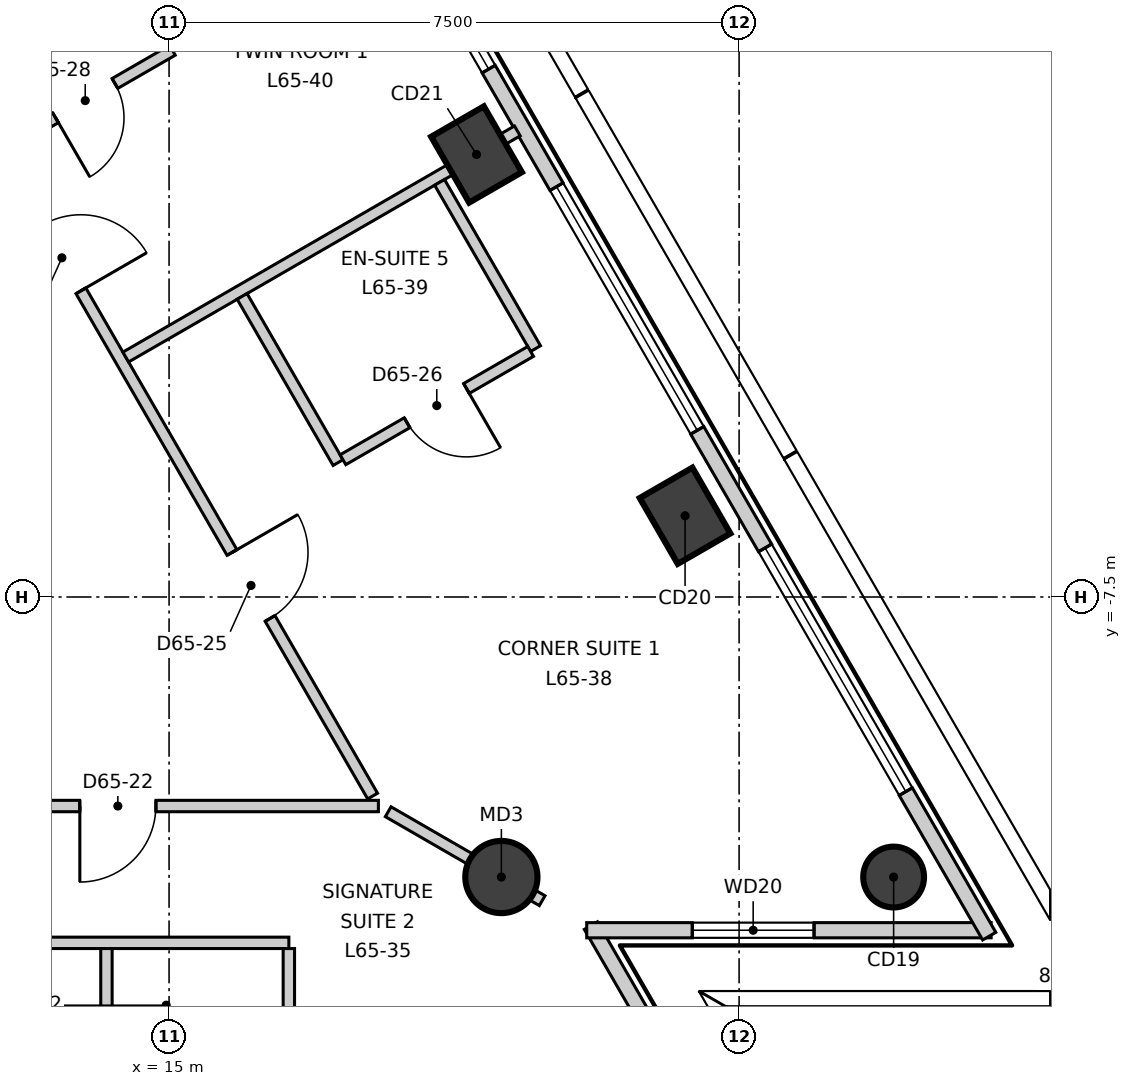
"""IFC4 building model, lengths in metres.
Left out: names, types, materials, properties, quantities, classifications, styles, units other than length and angle.
Written with IfcOpenShell. Run it as: python <this file> out.ifc"""

import sys

from ifc_helpers import new_model, si_unit, direction, frame, frame_2d, origin, origin_2d, place, context, subcontext, project, spatial, rectangle, circle, extrude, element, fill, save


model = new_model("IFC4")
c1 = context("Model", 3, precision=1e-05, world=origin(), true_north=direction((0.0, 1.0)))
c2 = subcontext(c1, "Body", "Model", "MODEL_VIEW")
j1 = project(units=[si_unit("LENGTHUNIT", "METRE"), si_unit("PLANEANGLEUNIT", "RADIAN")], contexts=[c1])
p1 = place(None, origin())
s1 = spatial("IfcSite", under=j1, at=p1, CompositionType="ELEMENT")
p2 = place(p1, origin())
s2 = spatial("IfcBuilding", under=s1, at=p2, CompositionType="ELEMENT")
p3 = place(p2, frame((0.0, 0.0, 279.1)))
s3 = spatial("IfcBuildingStorey", under=s2, at=p3, CompositionType="ELEMENT", Elevation=279.1)
p4 = place(p3, frame((24.533, -11.184, -0.3), z_axis=(0.0, 0.0, 1.0), x_axis=(-0.5, 0.866025403784, 0.0)))
e1 = element("IfcColumn", 1, at=p4, inside=s3, PredefinedType="COLUMN", context=c2, shape_type="SweptSolid", body=[
    extrude(circle(Radius=0.4, at=origin_2d()), origin(), (0.0, 0.0, 1.0), 3.6),
])
for number, where, z_axis, x_axis in (
    (2, (21.789, -6.431, -0.3), (0.0, 0.0, 1.0), (-0.5, 0.866, 0.0)),
    (3, (19.045, -1.678, -0.3), (0.0, 0.0, 1.0), (-0.5, 0.866, 0.0)),
):
    element("IfcColumn", number, at=place(p3, frame(where, z_axis=z_axis, x_axis=x_axis)), inside=s3, PredefinedType="COLUMN", context=c2, shape_type="SweptSolid", body=[
        extrude(rectangle(XDim=1.0, YDim=0.8, at=origin_2d()), origin(), (0.0, 0.0, 1.0), 3.6),
    ])
p5 = place(p3, frame((19.372, -11.184, -0.3), z_axis=(0.0, 0.0, 1.0), x_axis=(1.0, 0.0, 0.0)))
e4 = element("IfcColumn", 4, at=p5, inside=s3, PredefinedType="COLUMN", context=c2, shape_type="SweptSolid", body=[
    extrude(circle(Radius=0.475, at=origin_2d()), origin(), (0.0, 0.0, 1.0), 3.6),
])
p6 = place(p3, frame((23.21, -16.432, 0.0), z_axis=(0.0, 0.0, 1.0), x_axis=(-0.499854840714, 0.866109195318, 0.0)))
e5 = element("IfcWall", 5, at=p6, inside=s3, PredefinedType="ELEMENTEDWALL", context=c2, shape_type="SweptSolid", body=[
    extrude(rectangle(XDim=5.321, YDim=0.2, at=frame_2d((2.661, 0.0))), origin(), (0.0, 0.0, 1.0), 3.3),
])
p7 = place(p6, frame((1.99, 0.0, 0.9)))
e6 = element("IfcOpeningElement", 6, at=p7, cuts=e5, PredefinedType="OPENING", context=c2, shape_type="SweptSolid", body=[
    extrude(rectangle(XDim=1.6, YDim=2.2, at=frame_2d((0.8, 1.1))), frame((0.0, 0.11, 0.0), z_axis=(0.0, -1.0, 0.0), x_axis=(1.0, 0.0, 0.0)), (0.0, 0.0, 1.0), 0.22),
])
p8 = place(p3, frame((20.495, -11.884, 0.0), z_axis=(0.0, 0.0, 1.0), x_axis=(1.0, 0.0, 0.0)))
e7 = element("IfcWall", 7, at=p8, inside=s3, PredefinedType="ELEMENTEDWALL", context=c2, shape_type="SweptSolid", body=[
    extrude(rectangle(XDim=5.321, YDim=0.2, at=frame_2d((2.66, 0.0))), origin(), (0.0, 0.0, 1.0), 3.3),
])
p9 = place(p8, frame((1.39, 0.0, 0.9)))
e8 = element("IfcOpeningElement", 8, at=p9, cuts=e7, PredefinedType="OPENING", context=c2, shape_type="SweptSolid", body=[
    extrude(rectangle(XDim=1.6, YDim=2.2, at=frame_2d((0.8, 1.1))), frame((0.0, 0.11, 0.0), z_axis=(0.0, -1.0, 0.0), x_axis=(1.0, 0.0, 0.0)), (0.0, 0.0, 1.0), 0.22),
])
p10 = place(p3, frame((25.791, -11.962, 0.0), z_axis=(0.0, 0.0, 1.0), x_axis=(-0.500006870765, 0.86602143691, 0.0)))
e9 = element("IfcWall", 9, at=p10, inside=s3, PredefinedType="ELEMENTEDWALL", context=c2, shape_type="SweptSolid", body=[
    extrude(rectangle(XDim=46.49, YDim=0.2, at=frame_2d((23.245, 0.0))), origin(), (0.0, 0.0, 1.0), 3.3),
])
p11 = place(p10, frame((2.197, 0.0, 0.9)))
e10 = element("IfcOpeningElement", 10, at=p11, cuts=e9, PredefinedType="OPENING", context=c2, shape_type="SweptSolid", body=[
    extrude(rectangle(XDim=3.7, YDim=2.2, at=frame_2d((1.85, 1.1))), frame((0.0, 0.11, 0.0), z_axis=(0.0, -1.0, 0.0), x_axis=(1.0, 0.0, 0.0)), (0.0, 0.0, 1.0), 0.22),
])
p12 = place(p10, frame((7.685, 0.0, 0.9)))
e11 = element("IfcOpeningElement", 11, at=p12, cuts=e9, PredefinedType="OPENING", context=c2, shape_type="SweptSolid", body=[
    extrude(rectangle(XDim=3.7, YDim=2.2, at=frame_2d((1.85, 1.1))), frame((0.0, 0.11, 0.0), z_axis=(0.0, -1.0, 0.0), x_axis=(1.0, 0.0, 0.0)), (0.0, 0.0, 1.0), 0.22),
])
p13 = place(p10, frame((13.173, 0.0, 0.9)))
e12 = element("IfcOpeningElement", 12, at=p13, cuts=e9, PredefinedType="OPENING", context=c2, shape_type="SweptSolid", body=[
    extrude(rectangle(XDim=3.7, YDim=2.2, at=frame_2d((1.85, 1.1))), frame((0.0, 0.11, 0.0), z_axis=(0.0, -1.0, 0.0), x_axis=(1.0, 0.0, 0.0)), (0.0, 0.0, 1.0), 0.22),
])
p14 = place(p10, frame((18.661, 0.0, 0.9)))
e13 = element("IfcOpeningElement", 13, at=p14, cuts=e9, PredefinedType="OPENING", context=c2, shape_type="SweptSolid", body=[
    extrude(rectangle(XDim=3.7, YDim=2.2, at=frame_2d((1.85, 1.1))), frame((0.0, 0.11, 0.0), z_axis=(0.0, -1.0, 0.0), x_axis=(1.0, 0.0, 0.0)), (0.0, 0.0, 1.0), 0.22),
])
p15 = place(p10, frame((24.149, 0.0, 0.9)))
e14 = element("IfcOpeningElement", 14, at=p15, cuts=e9, PredefinedType="OPENING", context=c2, shape_type="SweptSolid", body=[
    extrude(rectangle(XDim=3.7, YDim=2.2, at=frame_2d((1.85, 1.1))), frame((0.0, 0.11, 0.0), z_axis=(0.0, -1.0, 0.0), x_axis=(1.0, 0.0, 0.0)), (0.0, 0.0, 1.0), 0.22),
])
p16 = place(p10, frame((29.637, 0.0, 0.9)))
e15 = element("IfcOpeningElement", 15, at=p16, cuts=e9, PredefinedType="OPENING", context=c2, shape_type="SweptSolid", body=[
    extrude(rectangle(XDim=3.7, YDim=2.2, at=frame_2d((1.85, 1.1))), frame((0.0, 0.11, 0.0), z_axis=(0.0, -1.0, 0.0), x_axis=(1.0, 0.0, 0.0)), (0.0, 0.0, 1.0), 0.22),
])
p17 = place(p10, frame((35.125, 0.0, 0.9)))
e16 = element("IfcOpeningElement", 16, at=p17, cuts=e9, PredefinedType="OPENING", context=c2, shape_type="SweptSolid", body=[
    extrude(rectangle(XDim=3.7, YDim=2.2, at=frame_2d((1.85, 1.1))), frame((0.0, 0.11, 0.0), z_axis=(0.0, -1.0, 0.0), x_axis=(1.0, 0.0, 0.0)), (0.0, 0.0, 1.0), 0.22),
])
p18 = place(p10, frame((40.613, 0.0, 0.9)))
e17 = element("IfcOpeningElement", 17, at=p18, cuts=e9, PredefinedType="OPENING", context=c2, shape_type="SweptSolid", body=[
    extrude(rectangle(XDim=3.7, YDim=2.2, at=frame_2d((1.85, 1.1))), frame((0.0, 0.11, 0.0), z_axis=(0.0, -1.0, 0.0), x_axis=(1.0, 0.0, 0.0)), (0.0, 0.0, 1.0), 0.22),
])
p19 = place(p3, frame((-17.604, -10.25, 0.0), z_axis=(0.0, 0.0, 1.0), x_axis=(1.0, 0.0, 0.0)))
e18 = element("IfcWall", 18, at=p19, inside=s3, PredefinedType="PARTITIONING", context=c2, shape_type="SweptSolid", body=[
    extrude(rectangle(XDim=35.358, YDim=0.15, at=frame_2d((17.679, 0.0))), origin(), (0.0, 0.0, 1.0), 3.3),
])
p20 = place(p19, frame((2.7, 0.0, 0.0)))
e19 = element("IfcOpeningElement", 19, at=p20, cuts=e18, PredefinedType="OPENING", context=c2, shape_type="SweptSolid", body=[
    extrude(rectangle(XDim=1.0, YDim=2.1, at=frame_2d((0.5, 1.05))), frame((0.0, 0.085, 0.0), z_axis=(0.0, -1.0, 0.0), x_axis=(1.0, 0.0, 0.0)), (0.0, 0.0, 1.0), 0.17),
])
p21 = place(p19, frame((14.878, 0.0, 0.0)))
e20 = element("IfcOpeningElement", 20, at=p21, cuts=e18, PredefinedType="OPENING", context=c2, shape_type="SweptSolid", body=[
    extrude(rectangle(XDim=1.0, YDim=2.1, at=frame_2d((0.5, 1.05))), frame((0.0, 0.085, 0.0), z_axis=(0.0, -1.0, 0.0), x_axis=(1.0, 0.0, 0.0)), (0.0, 0.0, 1.0), 0.17),
])
p22 = place(p19, frame((9.578, 0.0, 0.0)))
e21 = element("IfcOpeningElement", 21, at=p22, cuts=e18, PredefinedType="OPENING", context=c2, shape_type="SweptSolid", body=[
    extrude(rectangle(XDim=0.9, YDim=2.1, at=frame_2d((0.45, 1.05))), frame((0.0, 0.085, 0.0), z_axis=(0.0, -1.0, 0.0), x_axis=(1.0, 0.0, 0.0)), (0.0, 0.0, 1.0), 0.17),
])
p23 = place(p19, frame((11.678, 0.0, 0.0)))
e22 = element("IfcOpeningElement", 22, at=p23, cuts=e18, PredefinedType="OPENING", context=c2, shape_type="SweptSolid", body=[
    extrude(rectangle(XDim=0.9, YDim=2.1, at=frame_2d((0.45, 1.05))), frame((0.0, 0.085, 0.0), z_axis=(0.0, -1.0, 0.0), x_axis=(1.0, 0.0, 0.0)), (0.0, 0.0, 1.0), 0.17),
])
p24 = place(p19, frame((25.854, 0.0, 0.0)))
e23 = element("IfcOpeningElement", 23, at=p24, cuts=e18, PredefinedType="OPENING", context=c2, shape_type="SweptSolid", body=[
    extrude(rectangle(XDim=1.0, YDim=2.1, at=frame_2d((0.5, 1.05))), frame((0.0, 0.085, 0.0), z_axis=(0.0, -1.0, 0.0), x_axis=(1.0, 0.0, 0.0)), (0.0, 0.0, 1.0), 0.17),
])
p25 = place(p19, frame((20.554, 0.0, 0.0)))
e24 = element("IfcOpeningElement", 24, at=p25, cuts=e18, PredefinedType="OPENING", context=c2, shape_type="SweptSolid", body=[
    extrude(rectangle(XDim=0.9, YDim=2.1, at=frame_2d((0.45, 1.05))), frame((0.0, 0.085, 0.0), z_axis=(0.0, -1.0, 0.0), x_axis=(1.0, 0.0, 0.0)), (0.0, 0.0, 1.0), 0.17),
])
p26 = place(p19, frame((22.654, 0.0, 0.0)))
e25 = element("IfcOpeningElement", 25, at=p26, cuts=e18, PredefinedType="OPENING", context=c2, shape_type="SweptSolid", body=[
    extrude(rectangle(XDim=0.9, YDim=2.1, at=frame_2d((0.45, 1.05))), frame((0.0, 0.085, 0.0), z_axis=(0.0, -1.0, 0.0), x_axis=(1.0, 0.0, 0.0)), (0.0, 0.0, 1.0), 0.17),
])
p27 = place(p19, frame((31.43, 0.0, 0.0)))
e26 = element("IfcOpeningElement", 26, at=p27, cuts=e18, PredefinedType="OPENING", context=c2, shape_type="SweptSolid", body=[
    extrude(rectangle(XDim=1.0, YDim=2.1, at=frame_2d((0.5, 1.05))), frame((0.0, 0.085, 0.0), z_axis=(0.0, -1.0, 0.0), x_axis=(1.0, 0.0, 0.0)), (0.0, 0.0, 1.0), 0.17),
])
p28 = place(p3, frame((17.883, -10.325, 0.0), z_axis=(0.0, 0.0, 1.0), x_axis=(0.865928350888, -0.500168062883, 0.0)))
e27 = element("IfcWall", 27, at=p28, inside=s3, PredefinedType="PARTITIONING", context=c2, shape_type="SweptSolid", body=[
    extrude(rectangle(XDim=2.34, YDim=0.15, at=frame_2d((1.17, 0.0))), origin(), (0.0, 0.0, 1.0), 2.8),
])
p29 = place(p3, frame((0.075, 20.37, 0.0), z_axis=(0.0, 0.0, 1.0), x_axis=(0.500003985697, -0.866023102629, 0.0)))
e28 = element("IfcWall", 28, at=p29, inside=s3, PredefinedType="PARTITIONING", context=c2, shape_type="SweptSolid", body=[
    extrude(rectangle(XDim=35.206, YDim=0.15, at=frame_2d((17.603, 0.0))), origin(), (0.0, 0.0, 1.0), 3.3),
])
p30 = place(p29, frame((31.506, 0.0, 0.0)))
e29 = element("IfcOpeningElement", 29, at=p30, cuts=e28, PredefinedType="OPENING", context=c2, shape_type="SweptSolid", body=[
    extrude(rectangle(XDim=1.0, YDim=2.1, at=frame_2d((0.5, 1.05))), frame((0.0, 0.085, 0.0), z_axis=(0.0, -1.0, 0.0), x_axis=(1.0, 0.0, 0.0)), (0.0, 0.0, 1.0), 0.17),
])
p31 = place(p29, frame((26.529, 0.0, 0.0)))
e30 = element("IfcOpeningElement", 30, at=p31, cuts=e28, PredefinedType="OPENING", context=c2, shape_type="SweptSolid", body=[
    extrude(rectangle(XDim=1.0, YDim=2.1, at=frame_2d((0.5, 1.05))), frame((0.0, 0.085, 0.0), z_axis=(0.0, -1.0, 0.0), x_axis=(1.0, 0.0, 0.0)), (0.0, 0.0, 1.0), 0.17),
])
p32 = place(p29, frame((19.442, 0.0, 0.0)))
e31 = element("IfcOpeningElement", 31, at=p32, cuts=e28, PredefinedType="OPENING", context=c2, shape_type="SweptSolid", body=[
    extrude(rectangle(XDim=1.0, YDim=2.1, at=frame_2d((0.5, 1.05))), frame((0.0, 0.085, 0.0), z_axis=(0.0, -1.0, 0.0), x_axis=(1.0, 0.0, 0.0)), (0.0, 0.0, 1.0), 0.17),
])
p33 = place(p29, frame((8.254, 0.0, 0.0)))
e32 = element("IfcOpeningElement", 32, at=p33, cuts=e28, PredefinedType="OPENING", context=c2, shape_type="SweptSolid", body=[
    extrude(rectangle(XDim=1.0, YDim=2.1, at=frame_2d((0.5, 1.05))), frame((0.0, 0.085, 0.0), z_axis=(0.0, -1.0, 0.0), x_axis=(1.0, 0.0, 0.0)), (0.0, 0.0, 1.0), 0.17),
])
p34 = place(p29, frame((13.754, 0.0, 0.0)))
e33 = element("IfcOpeningElement", 33, at=p34, cuts=e28, PredefinedType="OPENING", context=c2, shape_type="SweptSolid", body=[
    extrude(rectangle(XDim=0.9, YDim=2.1, at=frame_2d((0.45, 1.05))), frame((0.0, 0.085, 0.0), z_axis=(0.0, -1.0, 0.0), x_axis=(1.0, 0.0, 0.0)), (0.0, 0.0, 1.0), 0.17),
])
p35 = place(p29, frame((11.554, 0.0, 0.0)))
e34 = element("IfcOpeningElement", 34, at=p35, cuts=e28, PredefinedType="OPENING", context=c2, shape_type="SweptSolid", body=[
    extrude(rectangle(XDim=0.9, YDim=2.1, at=frame_2d((0.45, 1.05))), frame((0.0, 0.085, 0.0), z_axis=(0.0, -1.0, 0.0), x_axis=(1.0, 0.0, 0.0)), (0.0, 0.0, 1.0), 0.17),
])
p36 = place(p29, frame((2.777, 0.0, 0.0)))
e35 = element("IfcOpeningElement", 35, at=p36, cuts=e28, PredefinedType="OPENING", context=c2, shape_type="SweptSolid", body=[
    extrude(rectangle(XDim=1.0, YDim=2.1, at=frame_2d((0.5, 1.05))), frame((0.0, 0.085, 0.0), z_axis=(0.0, -1.0, 0.0), x_axis=(1.0, 0.0, 0.0)), (0.0, 0.0, 1.0), 0.17),
])
p37 = place(p3, frame((14.43, -4.343, 0.0), z_axis=(0.0, 0.0, 1.0), x_axis=(0.865986712877, 0.50006700863, 0.0)))
e36 = element("IfcWall", 36, at=p37, inside=s3, PredefinedType="PARTITIONING", context=c2, shape_type="SweptSolid", body=[
    extrude(rectangle(XDim=5.949, YDim=0.15, at=frame_2d((2.975, 0.0))), origin(), (0.0, 0.0, 1.0), 3.3),
])
p38 = place(p3, frame((11.051, -12.05, 0.0), z_axis=(0.0, 0.0, 1.0), x_axis=(1.0, 0.0, 0.0)))
e37 = element("IfcWall", 37, at=p38, inside=s3, PredefinedType="PARTITIONING", context=c2, shape_type="SweptSolid", body=[
    extrude(rectangle(XDim=5.525, YDim=0.15, at=frame_2d((2.762, 0.0))), origin(), (0.0, 0.0, 1.0), 3.3),
])
p39 = place(p38, frame((1.075, 0.0, 0.0)))
e38 = element("IfcOpeningElement", 38, at=p39, cuts=e37, PredefinedType="OPENING", context=c2, shape_type="SweptSolid", body=[
    extrude(rectangle(XDim=0.9, YDim=2.1, at=frame_2d((0.45, 1.05))), frame((0.0, 0.085, 0.0), z_axis=(0.0, -1.0, 0.0), x_axis=(1.0, 0.0, 0.0)), (0.0, 0.0, 1.0), 0.17),
])
p40 = place(p3, frame((15.961, -3.545, 0.0), z_axis=(0.0, 0.0, 1.0), x_axis=(0.499789415832, -0.866146950478, 0.0)))
e39 = element("IfcWall", 39, at=p40, inside=s3, PredefinedType="PARTITIONING", context=c2, shape_type="SweptSolid", body=[
    extrude(rectangle(XDim=2.525, YDim=0.15, at=frame_2d((1.262, 0.0))), origin(), (0.0, 0.0, 1.0), 3.3),
])
p41 = place(p3, frame((18.559, -2.045, 0.0), z_axis=(0.0, 0.0, 1.0), x_axis=(0.500079482444, -0.865979509711, 0.0)))
e40 = element("IfcWall", 40, at=p41, inside=s3, PredefinedType="PARTITIONING", context=c2, shape_type="SweptSolid", body=[
    extrude(rectangle(XDim=2.525, YDim=0.15, at=frame_2d((1.263, 0.0))), origin(), (0.0, 0.0, 1.0), 3.3),
])
p42 = place(p3, frame((14.176, -14.975, 0.0), z_axis=(0.0, 0.0, 1.0), x_axis=(0.0, 1.0, 0.0)))
e41 = element("IfcWall", 41, at=p42, inside=s3, PredefinedType="PARTITIONING", context=c2, shape_type="SweptSolid", body=[
    extrude(rectangle(XDim=2.85, YDim=0.15, at=frame_2d((1.425, 0.0))), origin(), (0.0, 0.0, 1.0), 3.3),
])
p43 = place(p3, frame((12.836, -1.582, 0.0), z_axis=(0.0, 0.0, 1.0), x_axis=(0.865965520905, 0.500103705848, 0.0)))
e42 = element("IfcWall", 42, at=p43, inside=s3, PredefinedType="PARTITIONING", context=c2, shape_type="SweptSolid", body=[
    extrude(rectangle(XDim=2.55, YDim=0.15, at=frame_2d((1.275, 0.0))), origin(), (0.0, 0.0, 1.0), 3.3),
])
p44 = place(p43, frame((0.775, 0.0, 0.0)))
e43 = element("IfcOpeningElement", 43, at=p44, cuts=e42, PredefinedType="OPENING", context=c2, shape_type="SweptSolid", body=[
    extrude(rectangle(XDim=0.9, YDim=2.1, at=frame_2d((0.45, 1.05))), frame((0.0, 0.085, 0.0), z_axis=(0.0, -1.0, 0.0), x_axis=(1.0, 0.0, 0.0)), (0.0, 0.0, 1.0), 0.17),
])
p45 = place(p3, frame((16.576, -14.775, 0.0), z_axis=(0.0, 0.0, 1.0), x_axis=(0.0, 1.0, 0.0)))
e44 = element("IfcWall", 44, at=p45, inside=s3, PredefinedType="PARTITIONING", context=c2, shape_type="SweptSolid", body=[
    extrude(rectangle(XDim=2.65, YDim=0.15, at=frame_2d((1.325, 0.0))), origin(), (0.0, 0.0, 1.0), 3.3),
])
p46 = place(p45, frame((0.875, 0.0, 0.0)))
e45 = element("IfcOpeningElement", 45, at=p46, cuts=e44, PredefinedType="OPENING", context=c2, shape_type="SweptSolid", body=[
    extrude(rectangle(XDim=0.9, YDim=2.1, at=frame_2d((0.45, 1.05))), frame((0.0, 0.085, 0.0), z_axis=(0.0, -1.0, 0.0), x_axis=(1.0, 0.0, 0.0)), (0.0, 0.0, 1.0), 0.17),
])
p47 = place(p3, frame((17.288, -5.694, 0.0), z_axis=(0.0, 0.0, 1.0), x_axis=(0.866090043625, 0.499888023795, 0.0)))
e46 = element("IfcWall", 46, at=p47, inside=s3, PredefinedType="PARTITIONING", context=c2, shape_type="SweptSolid", body=[
    extrude(rectangle(XDim=2.851, YDim=0.15, at=frame_2d((1.425, 0.0))), origin(), (0.0, 0.0, 1.0), 3.3),
])
p48 = place(p47, frame((0.975, 0.0, 0.0)))
e47 = element("IfcOpeningElement", 47, at=p48, cuts=e46, PredefinedType="OPENING", context=c2, shape_type="SweptSolid", body=[
    extrude(rectangle(XDim=0.9, YDim=2.1, at=frame_2d((0.45, 1.05))), frame((0.0, 0.085, 0.0), z_axis=(0.0, -1.0, 0.0), x_axis=(1.0, 0.0, 0.0)), (0.0, 0.0, 1.0), 0.17),
])
p49 = place(p9, origin())
e48 = element("IfcWindow", 48, at=p49, inside=s3, PartitioningType="SINGLE_PANEL", PredefinedType="WINDOW", context=c2, shape_type="SweptSolid", body=[
    extrude(rectangle(XDim=1.6, YDim=2.2, at=frame_2d((0.8, 1.1))), frame((0.0, 0.03, 0.0), z_axis=(0.0, -1.0, 0.0), x_axis=(1.0, 0.0, 0.0)), (0.0, 0.0, 1.0), 0.06),
])
fill(e8, e48)
p50 = place(p11, origin())
e49 = element("IfcWindow", 49, at=p50, inside=s3, PartitioningType="SINGLE_PANEL", PredefinedType="WINDOW", context=c2, shape_type="SweptSolid", body=[
    extrude(rectangle(XDim=3.7, YDim=2.2, at=frame_2d((1.85, 1.1))), frame((0.0, 0.03, 0.0), z_axis=(0.0, -1.0, 0.0), x_axis=(1.0, 0.0, 0.0)), (0.0, 0.0, 1.0), 0.06),
])
fill(e10, e49)
p51 = place(p12, origin())
e50 = element("IfcWindow", 50, at=p51, inside=s3, PartitioningType="SINGLE_PANEL", PredefinedType="WINDOW", context=c2, shape_type="SweptSolid", body=[
    extrude(rectangle(XDim=3.7, YDim=2.2, at=frame_2d((1.85, 1.1))), frame((0.0, 0.03, 0.0), z_axis=(0.0, -1.0, 0.0), x_axis=(1.0, 0.0, 0.0)), (0.0, 0.0, 1.0), 0.06),
])
fill(e11, e50)
p52 = place(p13, origin())
e51 = element("IfcWindow", 51, at=p52, inside=s3, PartitioningType="SINGLE_PANEL", PredefinedType="WINDOW", context=c2, shape_type="SweptSolid", body=[
    extrude(rectangle(XDim=3.7, YDim=2.2, at=frame_2d((1.85, 1.1))), frame((0.0, 0.03, 0.0), z_axis=(0.0, -1.0, 0.0), x_axis=(1.0, 0.0, 0.0)), (0.0, 0.0, 1.0), 0.06),
])
fill(e12, e51)
p53 = place(p27, origin())
e52 = element("IfcDoor", 52, at=p53, inside=s3, OperationType="SINGLE_SWING_LEFT", PredefinedType="DOOR", context=c2, shape_type="SweptSolid", body=[
    extrude(rectangle(XDim=1.0, YDim=2.1, at=frame_2d((0.5, 1.05))), frame((0.0, 0.025, 0.0), z_axis=(0.0, -1.0, 0.0), x_axis=(1.0, 0.0, 0.0)), (0.0, 0.0, 1.0), 0.05),
])
fill(e26, e52)
p54 = place(p30, origin())
e53 = element("IfcDoor", 53, at=p54, inside=s3, OperationType="SINGLE_SWING_RIGHT", PredefinedType="DOOR", context=c2, shape_type="SweptSolid", body=[
    extrude(rectangle(XDim=1.0, YDim=2.1, at=frame_2d((0.5, 1.05))), frame((0.0, 0.025, 0.0), z_axis=(0.0, -1.0, 0.0), x_axis=(1.0, 0.0, 0.0)), (0.0, 0.0, 1.0), 0.05),
])
fill(e29, e53)
p55 = place(p48, origin())
e54 = element("IfcDoor", 54, at=p55, inside=s3, OperationType="SINGLE_SWING_RIGHT", PredefinedType="DOOR", context=c2, shape_type="SweptSolid", body=[
    extrude(rectangle(XDim=0.9, YDim=2.1, at=frame_2d((0.45, 1.05))), frame((0.0, 0.025, 0.0), z_axis=(0.0, -1.0, 0.0), x_axis=(1.0, 0.0, 0.0)), (0.0, 0.0, 1.0), 0.05),
])
fill(e47, e54)
p56 = place(p31, origin())
e55 = element("IfcDoor", 55, at=p56, inside=s3, OperationType="SINGLE_SWING_LEFT", PredefinedType="DOOR", context=c2, shape_type="SweptSolid", body=[
    extrude(rectangle(XDim=1.0, YDim=2.1, at=frame_2d((0.5, 1.05))), frame((0.0, 0.025, 0.0), z_axis=(0.0, -1.0, 0.0), x_axis=(1.0, 0.0, 0.0)), (0.0, 0.0, 1.0), 0.05),
])
fill(e30, e55)
p57 = place(p44, origin())
e56 = element("IfcDoor", 56, at=p57, inside=s3, OperationType="SINGLE_SWING_LEFT", PredefinedType="DOOR", context=c2, shape_type="SweptSolid", body=[
    extrude(rectangle(XDim=0.9, YDim=2.1, at=frame_2d((0.45, 1.05))), frame((0.0, 0.025, 0.0), z_axis=(0.0, -1.0, 0.0), x_axis=(1.0, 0.0, 0.0)), (0.0, 0.0, 1.0), 0.05),
])
fill(e43, e56)
save(model, sys.argv[1])
